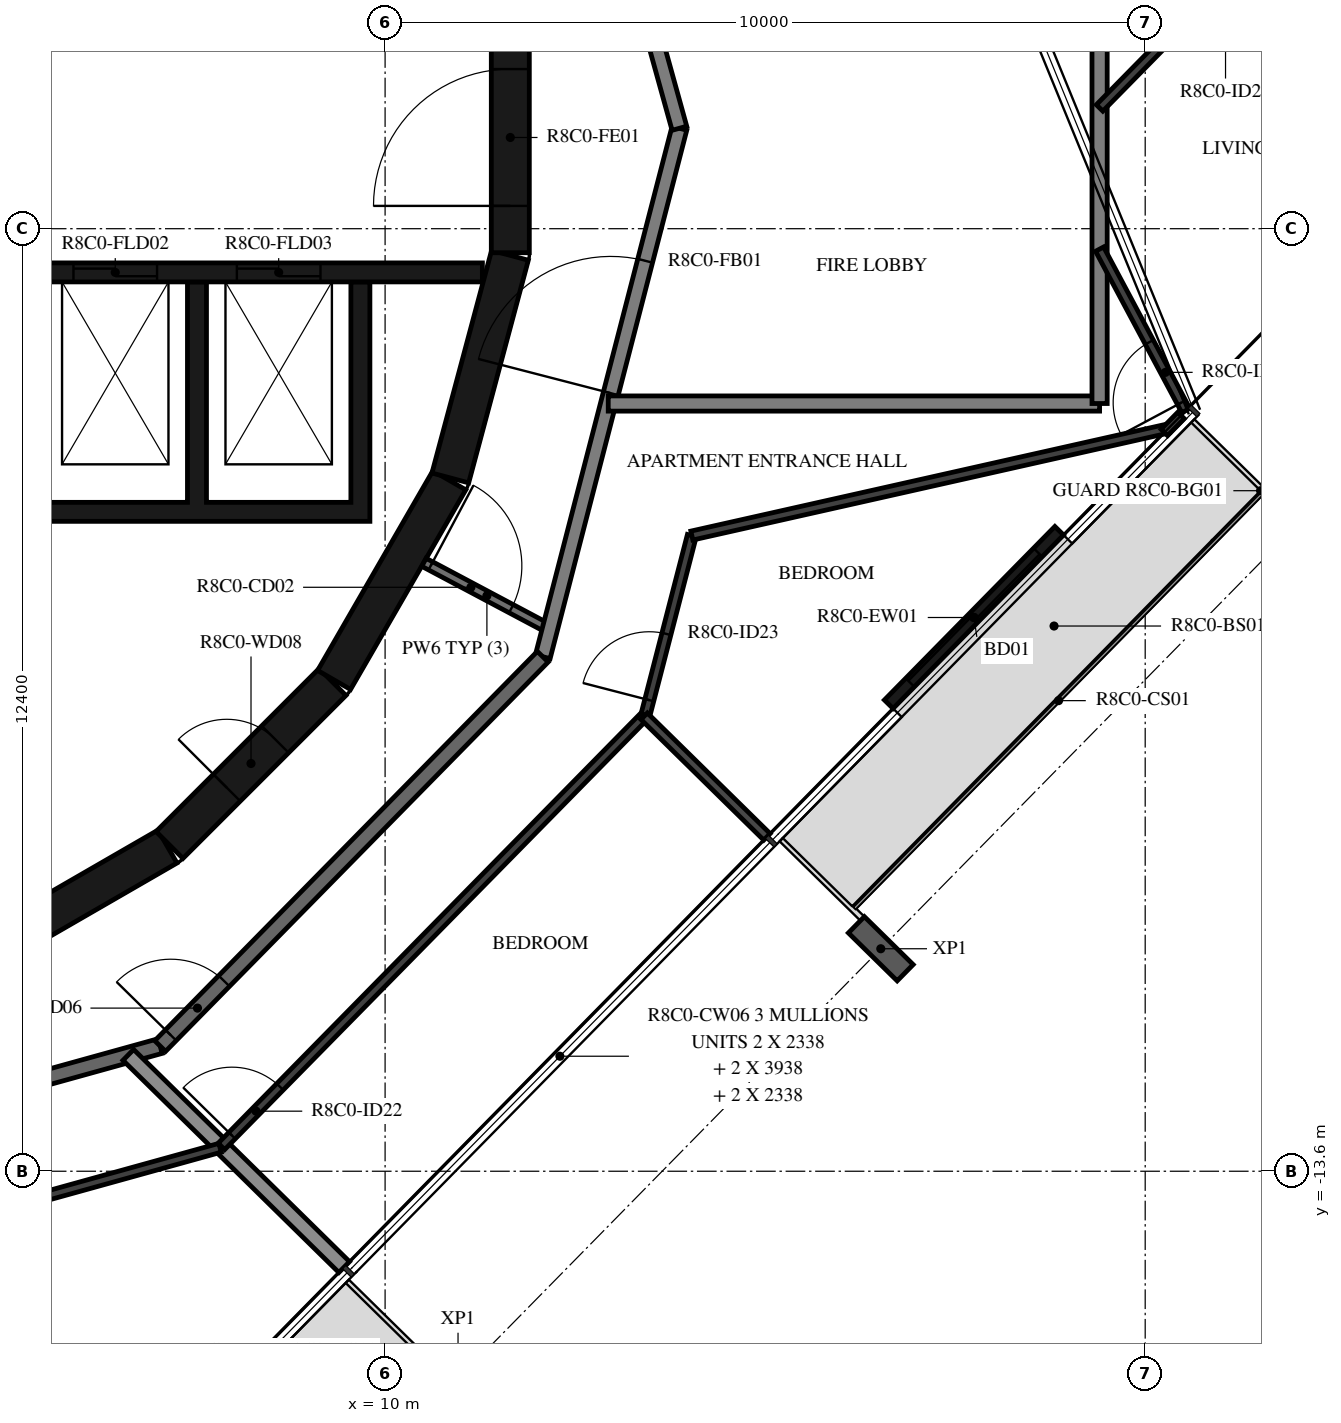
"""IFC4 building model, lengths in metres.
Left out: names, types, materials, properties, quantities, classifications, styles, units other than length and angle.
Written with IfcOpenShell. Run it as: python <this file> out.ifc"""

import sys

from ifc_helpers import new_model, si_unit, direction, frame, frame_2d, origin, origin_2d, place, context, subcontext, project, spatial, polyline, rectangle, i_section, outline, extrude, element, fill, save


model = new_model("IFC4")
c1 = context("Model", 3, precision=1e-05, world=origin(), true_north=direction((0.0, 1.0)))
c2 = subcontext(c1, "Body", "Model", "MODEL_VIEW")
j1 = project(units=[si_unit("LENGTHUNIT", "METRE"), si_unit("PLANEANGLEUNIT", "RADIAN")], contexts=[c1])
p1 = place(None, origin())
s1 = spatial("IfcSite", under=j1, at=p1, CompositionType="ELEMENT")
p2 = place(p1, origin())
s2 = spatial("IfcBuilding", under=s1, at=p2, CompositionType="ELEMENT")
p3 = place(p2, frame((0.0, 0.0, 319.2)))
s3 = spatial("IfcBuildingStorey", under=s2, at=p3, CompositionType="ELEMENT", Elevation=319.2)
p4 = place(p3, frame((16.521, -10.673, -0.38), z_axis=(0.0, 0.0, 1.0), x_axis=(-0.70090935439, -0.713250360623, 0.0)))
e1 = element("IfcColumn", 1, at=p4, inside=s3, PredefinedType="COLUMN", context=c2, shape_type="SweptSolid", body=[
    extrude(i_section(OverallWidth=0.3, OverallDepth=0.9, WebThickness=0.019, FlangeThickness=0.035, FilletRadius=0.03, at=origin_2d()), origin(), (0.0, 0.0, 1.0), 3.5),
])
p5 = place(p3, frame((16.626, -7.456, 0.0), z_axis=(0.0, 0.0, 1.0), x_axis=(0.700900076932, 0.713259477439, 0.0)))
e2 = element("IfcWall", 2, at=p5, inside=s3, PredefinedType="STANDARD", context=c2, shape_type="SweptSolid", body=[
    extrude(rectangle(XDim=3.2, YDim=0.16, at=frame_2d((1.6, 0.0))), origin(), (0.0, 0.0, 1.0), 3.12),
])
p6 = place(p5, frame((0.4, 0.0, 0.0)))
e3 = element("IfcOpeningElement", 3, at=p6, cuts=e2, PredefinedType="OPENING", context=c2, shape_type="SweptSolid", body=[
    extrude(rectangle(XDim=2.4, YDim=2.4, at=frame_2d((1.2, 1.2))), frame((0.0, 0.09, 0.0), z_axis=(0.0, -1.0, 0.0), x_axis=(1.0, 0.0, 0.0)), (0.0, 0.0, 1.0), 0.18),
])
p7 = place(p3, frame((4.51, -10.845, 0.0), z_axis=(0.0, 0.0, 1.0), x_axis=(0.865975092491, 0.500087131594, 0.0)))
e4 = element("IfcWall", 4, at=p7, inside=s3, PredefinedType="SHEAR", context=c2, shape_type="SweptSolid", body=[
    extrude(rectangle(XDim=3.033, YDim=0.5, at=frame_2d((1.516, 0.0))), origin(), (0.0, 0.0, 1.0), 3.12),
])
p8 = place(p3, frame((7.164, -9.308, 0.0), z_axis=(0.0, 0.0, 1.0), x_axis=(0.707106781187, 0.707106781187, 0.0)))
e5 = element("IfcWall", 5, at=p8, inside=s3, PredefinedType="SHEAR", context=c2, shape_type="SweptSolid", body=[
    extrude(rectangle(XDim=3.032, YDim=0.5, at=frame_2d((1.516, 0.0))), origin(), (0.0, 0.0, 1.0), 3.12),
])
p9 = place(p8, frame((1.066, 0.0, 0.0)))
e6 = element("IfcOpeningElement", 6, at=p9, cuts=e5, PredefinedType="OPENING", context=c2, shape_type="SweptSolid", body=[
    extrude(rectangle(XDim=0.9, YDim=2.1, at=frame_2d((0.45, 1.05))), frame((0.0, 0.26, 0.0), z_axis=(0.0, -1.0, 0.0), x_axis=(1.0, 0.0, 0.0)), (0.0, 0.0, 1.0), 0.52),
])
for number, where, z_axis, x_axis in (
    (7, (9.329, -7.137, 0.0), (0.0, 0.0, 1.0), (0.5, 0.866, 0.0)),
    (8, (10.858, -4.479, 0.0), (0.0, 0.0, 1.0), (0.259, 0.966, 0.0)),
):
    element("IfcWall", number, at=place(p3, frame(where, z_axis=z_axis, x_axis=x_axis)), inside=s3, PredefinedType="SHEAR", context=c2, shape_type="SweptSolid", body=[
        extrude(rectangle(XDim=3.033, YDim=0.5, at=frame_2d((1.516, 0.0))), origin(), (0.0, 0.0, 1.0), 3.12),
    ])
p10 = place(p3, frame((11.647, -1.516, 0.0), z_axis=(0.0, 0.0, 1.0), x_axis=(0.0, 1.0, 0.0)))
e9 = element("IfcWall", 9, at=p10, inside=s3, PredefinedType="SHEAR", context=c2, shape_type="SweptSolid", body=[
    extrude(rectangle(XDim=3.033, YDim=0.5, at=frame_2d((1.516, 0.0))), origin(), (0.0, 0.0, 1.0), 3.12),
])
p11 = place(p10, frame((0.616, 0.0, 0.0)))
e10 = element("IfcOpeningElement", 10, at=p11, cuts=e9, PredefinedType="OPENING", context=c2, shape_type="SweptSolid", body=[
    extrude(rectangle(XDim=1.8, YDim=2.1, at=frame_2d((0.9, 1.05))), frame((0.0, 0.26, 0.0), z_axis=(0.0, -1.0, 0.0), x_axis=(1.0, 0.0, 0.0)), (0.0, 0.0, 1.0), 0.52),
])
p12 = place(p3, origin())
e11 = element("IfcWall", 11, at=p12, inside=s3, PredefinedType="SHEAR", context=c2, shape_type="SweptSolid", body=[
    extrude(outline(polyline([(9.8, -5.05), (9.8, -4.8), (9.8, -1.9), (9.55, -1.9), (9.55, -4.8), (7.65, -4.8), (7.65, -1.9), (7.4, -1.9), (7.4, -4.8), (5.5, -4.8), (5.5, -1.9), (5.25, -1.9), (5.25, -4.8), (3.35, -4.8), (3.35, -1.9), (3.1, -1.9), (3.1, -4.8), (1.2, -4.8), (1.2, -1.9), (0.95, -1.9), (0.95, -4.8), (-0.95, -4.8), (-0.95, -1.9), (-1.2, -1.9), (-1.2, -4.8), (-3.1, -4.8), (-3.1, -1.9), (-3.35, -1.9), (-3.35, -4.8), (-5.25, -4.8), (-5.25, -1.9), (-5.5, -1.9), (-5.5, -4.8), (-9.55, -4.8), (-9.55, -1.9), (-9.8, -1.9), (-9.8, -4.8), (-9.8, -5.05), (9.8, -5.05)])), origin(), (0.0, 0.0, 1.0), 3.12),
])
p13 = place(p3, frame((3.35, -1.775, 0.0), z_axis=(0.0, 0.0, 1.0), x_axis=(1.0, 0.0, 0.0)))
e12 = element("IfcWall", 12, at=p13, inside=s3, PredefinedType="SHEAR", context=c2, shape_type="SweptSolid", body=[
    extrude(rectangle(XDim=7.93, YDim=0.25, at=frame_2d((3.965, 0.0))), origin(), (0.0, 0.0, 1.0), 3.12),
])
p14 = place(p13, frame((0.4, 0.0, 0.0)))
e13 = element("IfcOpeningElement", 13, at=p14, cuts=e12, PredefinedType="OPENING", context=c2, shape_type="SweptSolid", body=[
    extrude(rectangle(XDim=1.1, YDim=2.4, at=frame_2d((0.55, 1.2))), frame((0.0, 0.135, 0.0), z_axis=(0.0, -1.0, 0.0), x_axis=(1.0, 0.0, 0.0)), (0.0, 0.0, 1.0), 0.27),
])
p15 = place(p13, frame((2.55, 0.0, 0.0)))
e14 = element("IfcOpeningElement", 14, at=p15, cuts=e12, PredefinedType="OPENING", context=c2, shape_type="SweptSolid", body=[
    extrude(rectangle(XDim=1.1, YDim=2.4, at=frame_2d((0.55, 1.2))), frame((0.0, 0.135, 0.0), z_axis=(0.0, -1.0, 0.0), x_axis=(1.0, 0.0, 0.0)), (0.0, 0.0, 1.0), 0.27),
])
p16 = place(p13, frame((4.7, 0.0, 0.0)))
e15 = element("IfcOpeningElement", 15, at=p16, cuts=e12, PredefinedType="OPENING", context=c2, shape_type="SweptSolid", body=[
    extrude(rectangle(XDim=1.1, YDim=2.4, at=frame_2d((0.55, 1.2))), frame((0.0, 0.135, 0.0), z_axis=(0.0, -1.0, 0.0), x_axis=(1.0, 0.0, 0.0)), (0.0, 0.0, 1.0), 0.27),
])
p17 = place(p3, frame((10.511, -5.589, 0.0), z_axis=(0.0, 0.0, 1.0), x_axis=(0.882957311919, -0.469453283437, 0.0)))
e16 = element("IfcWall", 16, at=p17, inside=s3, PredefinedType="PARTITIONING", context=c2, shape_type="SweptSolid", body=[
    extrude(rectangle(XDim=1.876, YDim=0.12, at=frame_2d((0.938, 0.0))), origin(), (0.0, 0.0, 1.0), 3.12),
])
p18 = place(p17, frame((0.1, 0.0, 0.0)))
e17 = element("IfcOpeningElement", 17, at=p18, cuts=e16, PredefinedType="OPENING", context=c2, shape_type="SweptSolid", body=[
    extrude(rectangle(XDim=1.2, YDim=2.1, at=frame_2d((0.6, 1.05))), frame((0.0, 0.07, 0.0), z_axis=(0.0, -1.0, 0.0), x_axis=(1.0, 0.0, 0.0)), (0.0, 0.0, 1.0), 0.14),
])
p19 = place(p3, frame((12.074, -6.831, 0.0), z_axis=(0.0, 0.0, 1.0), x_axis=(0.250391063186, 0.968144780225, 0.0)))
e18 = element("IfcWall", 18, at=p19, inside=s3, PredefinedType="STANDARD", context=c2, shape_type="SweptSolid", body=[
    extrude(rectangle(XDim=7.181, YDim=0.2, at=frame_2d((3.591, 0.0))), origin(), (0.0, 0.0, 1.0), 3.12),
])
p20 = place(p19, frame((3.581, 0.0, 0.0)))
e19 = element("IfcOpeningElement", 19, at=p20, cuts=e18, PredefinedType="OPENING", context=c2, shape_type="SweptSolid", body=[
    extrude(rectangle(XDim=1.8, YDim=2.1, at=frame_2d((0.9, 1.05))), frame((0.0, 0.11, 0.0), z_axis=(0.0, -1.0, 0.0), x_axis=(1.0, 0.0, 0.0)), (0.0, 0.0, 1.0), 0.22),
])
p21 = place(p3, frame((13.872, 0.121, 0.0), z_axis=(0.0, 0.0, 1.0), x_axis=(-0.267291928416, 0.963615600228, 0.0)))
e20 = element("IfcWall", 20, at=p21, inside=s3, PredefinedType="STANDARD", context=c2, shape_type="SweptSolid", body=[
    extrude(rectangle(XDim=3.507, YDim=0.2, at=frame_2d((1.753, 0.0))), origin(), (0.0, 0.0, 1.0), 3.12),
])
p22 = place(p3, frame((0.121, -13.872, 0.0), z_axis=(0.0, 0.0, 1.0), x_axis=(0.963625960674, 0.267254575108, 0.0)))
e21 = element("IfcWall", 21, at=p22, inside=s3, PredefinedType="STANDARD", context=c2, shape_type="SweptSolid", body=[
    extrude(rectangle(XDim=7.181, YDim=0.2, at=frame_2d((3.591, 0.0))), origin(), (0.0, 0.0, 1.0), 3.12),
])
p23 = place(p3, frame((7.041, -11.953, 0.0), z_axis=(0.0, 0.0, 1.0), x_axis=(0.70090916255, 0.713250549143, 0.0)))
e22 = element("IfcWall", 22, at=p23, inside=s3, PredefinedType="STANDARD", context=c2, shape_type="SweptSolid", body=[
    extrude(rectangle(XDim=7.181, YDim=0.2, at=frame_2d((3.59, 0.0))), origin(), (0.0, 0.0, 1.0), 3.12),
])
p24 = place(p23, frame((0.2, 0.0, 0.0)))
e23 = element("IfcOpeningElement", 23, at=p24, cuts=e22, PredefinedType="OPENING", context=c2, shape_type="SweptSolid", body=[
    extrude(rectangle(XDim=1.0, YDim=2.1, at=frame_2d((0.5, 1.05))), frame((0.0, 0.11, 0.0), z_axis=(0.0, -1.0, 0.0), x_axis=(1.0, 0.0, 0.0)), (0.0, 0.0, 1.0), 0.22),
])
p25 = place(p3, frame((12.936, -3.5, 0.0), z_axis=(0.0, 0.0, 1.0), x_axis=(1.0, 0.0, 0.0)))
e24 = element("IfcWall", 24, at=p25, inside=s3, PredefinedType="STANDARD", context=c2, shape_type="SweptSolid", body=[
    extrude(rectangle(XDim=6.464, YDim=0.2, at=frame_2d((3.232, 0.0))), origin(), (0.0, 0.0, 1.0), 3.12),
])
p26 = place(p3, frame((19.4, -3.5, 0.0), z_axis=(0.0, 0.0, 1.0), x_axis=(0.0, 1.0, 0.0)))
e25 = element("IfcWall", 25, at=p26, inside=s3, PredefinedType="STANDARD", context=c2, shape_type="SweptSolid", body=[
    extrude(rectangle(XDim=6.954, YDim=0.2, at=frame_2d((3.477, 0.0))), origin(), (0.0, 0.0, 1.0), 3.12),
])
p27 = place(p3, frame((9.462, -14.861, 0.0), z_axis=(0.0, 0.0, 1.0), x_axis=(-0.713302018318, 0.700856783276, 0.0)))
e26 = element("IfcWall", 26, at=p27, inside=s3, PredefinedType="STANDARD", context=c2, shape_type="SweptSolid", body=[
    extrude(rectangle(XDim=3.982, YDim=0.2, at=frame_2d((1.991, 0.0))), origin(), (0.0, 0.0, 1.0), 2.73),
])
p28 = place(p3, frame((0.135, -15.425, 0.0), z_axis=(0.0, 0.0, 1.0), x_axis=(0.963633899075, 0.267225950373, 0.0)))
e27 = element("IfcWall", 27, at=p28, inside=s3, PredefinedType="PARTITIONING", context=c2, shape_type="SweptSolid", body=[
    extrude(rectangle(XDim=7.985, YDim=0.12, at=frame_2d((3.992, 0.0))), origin(), (0.0, 0.0, 1.0), 3.12),
])
p29 = place(p28, frame((0.2, 0.0, 0.0)))
e28 = element("IfcOpeningElement", 28, at=p29, cuts=e27, PredefinedType="OPENING", context=c2, shape_type="SweptSolid", body=[
    extrude(rectangle(XDim=0.8, YDim=2.1, at=frame_2d((0.4, 1.05))), frame((0.0, 0.07, 0.0), z_axis=(0.0, -1.0, 0.0), x_axis=(1.0, 0.0, 0.0)), (0.0, 0.0, 1.0), 0.14),
])
p30 = place(p28, frame((3.914, 0.0, 0.0)))
e29 = element("IfcOpeningElement", 29, at=p30, cuts=e27, PredefinedType="OPENING", context=c2, shape_type="SweptSolid", body=[
    extrude(rectangle(XDim=0.9, YDim=2.1, at=frame_2d((0.45, 1.05))), frame((0.0, 0.07, 0.0), z_axis=(0.0, -1.0, 0.0), x_axis=(1.0, 0.0, 0.0)), (0.0, 0.0, 1.0), 0.14),
])
p31 = place(p3, frame((20.535, -3.593, 0.0), z_axis=(0.0, 0.0, 1.0), x_axis=(-0.471340561072, 0.881951288614, 0.0)))
e30 = element("IfcWall", 30, at=p31, inside=s3, PredefinedType="PARTITIONING", context=c2, shape_type="SweptSolid", body=[
    extrude(rectangle(XDim=2.408, YDim=0.12, at=frame_2d((1.204, 0.0))), origin(), (0.0, 0.0, 1.0), 3.12),
])
p32 = place(p31, frame((0.12, 0.0, 0.0)))
e31 = element("IfcOpeningElement", 31, at=p32, cuts=e30, PredefinedType="OPENING", context=c2, shape_type="SweptSolid", body=[
    extrude(rectangle(XDim=0.9, YDim=2.1, at=frame_2d((0.45, 1.05))), frame((0.0, 0.07, 0.0), z_axis=(0.0, -1.0, 0.0), x_axis=(1.0, 0.0, 0.0)), (0.0, 0.0, 1.0), 0.14),
])
p33 = place(p3, frame((7.846, -13.273, 0.0), z_axis=(0.0, 0.0, 1.0), x_axis=(0.700911018066, 0.713248725728, 0.0)))
e32 = element("IfcWall", 32, at=p33, inside=s3, PredefinedType="PARTITIONING", context=c2, shape_type="SweptSolid", body=[
    extrude(rectangle(XDim=7.935, YDim=0.12, at=frame_2d((3.968, 0.0))), origin(), (0.0, 0.0, 1.0), 3.12),
])
p34 = place(p33, frame((0.2, 0.0, 0.0)))
e33 = element("IfcOpeningElement", 33, at=p34, cuts=e32, PredefinedType="OPENING", context=c2, shape_type="SweptSolid", body=[
    extrude(rectangle(XDim=0.9, YDim=2.1, at=frame_2d((0.45, 1.05))), frame((0.0, 0.07, 0.0), z_axis=(0.0, -1.0, 0.0), x_axis=(1.0, 0.0, 0.0)), (0.0, 0.0, 1.0), 0.14),
])
p35 = place(p3, frame((13.426, -7.596, 0.0), z_axis=(0.0, 0.0, 1.0), x_axis=(0.250402253482, 0.968141886012, 0.0)))
e34 = element("IfcWall", 34, at=p35, inside=s3, PredefinedType="PARTITIONING", context=c2, shape_type="SweptSolid", body=[
    extrude(rectangle(XDim=2.437, YDim=0.12, at=frame_2d((1.218, 0.0))), origin(), (0.0, 0.0, 1.0), 3.12),
])
p36 = place(p35, frame((0.2, 0.0, 0.0)))
e35 = element("IfcOpeningElement", 35, at=p36, cuts=e34, PredefinedType="OPENING", context=c2, shape_type="SweptSolid", body=[
    extrude(rectangle(XDim=0.9, YDim=2.1, at=frame_2d((0.45, 1.05))), frame((0.0, 0.07, 0.0), z_axis=(0.0, -1.0, 0.0), x_axis=(1.0, 0.0, 0.0)), (0.0, 0.0, 1.0), 0.14),
])
p37 = place(p3, frame((14.036, -5.237, 0.0), z_axis=(0.0, 0.0, 1.0), x_axis=(0.975645756324, 0.219352132805, 0.0)))
e36 = element("IfcWall", 36, at=p37, inside=s3, PredefinedType="PARTITIONING", context=c2, shape_type="SweptSolid", body=[
    extrude(rectangle(XDim=6.424, YDim=0.12, at=frame_2d((3.212, 0.0))), origin(), (0.0, 0.0, 1.0), 3.12),
])
p38 = place(p3, frame((20.471, -3.657, 0.0), z_axis=(0.0, 0.0, 1.0), x_axis=(-0.700842635321, -0.713315919153, 0.0)))
e37 = element("IfcWall", 37, at=p38, inside=s3, PredefinedType="PARTITIONING", context=c2, shape_type="SweptSolid", body=[
    extrude(rectangle(XDim=0.313, YDim=0.12, at=frame_2d((0.157, 0.0))), origin(), (0.0, 0.0, 1.0), 3.12),
])
p39 = place(p3, frame((20.654, 1.665, 0.0), z_axis=(0.0, 0.0, 1.0), x_axis=(-0.700870484553, -0.713288555833, 0.0)))
e38 = element("IfcWall", 38, at=p39, inside=s3, PredefinedType="PARTITIONING", context=c2, shape_type="SweptSolid", body=[
    extrude(rectangle(XDim=1.789, YDim=0.12, at=frame_2d((0.895, 0.0))), origin(), (0.0, 0.0, 1.0), 3.12),
])
p40 = place(p3, frame((15.024, -9.201, 0.0), z_axis=(0.0, 0.0, 1.0), x_axis=(-0.713331704042, 0.700826569137, 0.0)))
e39 = element("IfcWall", 39, at=p40, inside=s3, PredefinedType="PARTITIONING", context=c2, shape_type="SweptSolid", body=[
    extrude(rectangle(XDim=2.265, YDim=0.12, at=frame_2d((1.132, 0.0))), origin(), (0.0, 0.0, 1.0), 2.73),
])
p41 = place(p6, origin())
e40 = element("IfcDoor", 40, at=p41, inside=s3, OperationType="DOUBLE_DOOR_SLIDING", PredefinedType="DOOR", context=c2, shape_type="SweptSolid", body=[
    extrude(rectangle(XDim=2.4, YDim=2.4, at=frame_2d((1.2, 1.2))), frame((0.0, 0.025, 0.0), z_axis=(0.0, -1.0, 0.0), x_axis=(1.0, 0.0, 0.0)), (0.0, 0.0, 1.0), 0.05),
])
fill(e3, e40)
p42 = place(p11, origin())
e41 = element("IfcDoor", 41, at=p42, inside=s3, OperationType="DOUBLE_DOOR_SINGLE_SWING", PredefinedType="DOOR", context=c2, shape_type="SweptSolid", body=[
    extrude(rectangle(XDim=1.8, YDim=2.1, at=frame_2d((0.9, 1.05))), frame((0.0, 0.025, 0.0), z_axis=(0.0, -1.0, 0.0), x_axis=(1.0, 0.0, 0.0)), (0.0, 0.0, 1.0), 0.05),
])
fill(e10, e41)
p43 = place(p15, origin())
e42 = element("IfcDoor", 42, at=p43, inside=s3, OperationType="DOUBLE_DOOR_SLIDING", PredefinedType="DOOR", context=c2, shape_type="SweptSolid", body=[
    extrude(rectangle(XDim=1.1, YDim=2.4, at=frame_2d((0.55, 1.2))), frame((0.0, 0.025, 0.0), z_axis=(0.0, -1.0, 0.0), x_axis=(1.0, 0.0, 0.0)), (0.0, 0.0, 1.0), 0.05),
])
fill(e14, e42)
p44 = place(p16, origin())
e43 = element("IfcDoor", 43, at=p44, inside=s3, OperationType="DOUBLE_DOOR_SLIDING", PredefinedType="DOOR", context=c2, shape_type="SweptSolid", body=[
    extrude(rectangle(XDim=1.1, YDim=2.4, at=frame_2d((0.55, 1.2))), frame((0.0, 0.025, 0.0), z_axis=(0.0, -1.0, 0.0), x_axis=(1.0, 0.0, 0.0)), (0.0, 0.0, 1.0), 0.05),
])
fill(e15, e43)
p45 = place(p9, origin())
e44 = element("IfcDoor", 44, at=p45, inside=s3, OperationType="SINGLE_SWING_RIGHT", PredefinedType="DOOR", context=c2, shape_type="SweptSolid", body=[
    extrude(rectangle(XDim=0.9, YDim=2.1, at=frame_2d((0.45, 1.05))), frame((0.0, 0.025, 0.0), z_axis=(0.0, -1.0, 0.0), x_axis=(1.0, 0.0, 0.0)), (0.0, 0.0, 1.0), 0.05),
])
fill(e6, e44)
p46 = place(p24, origin())
e45 = element("IfcDoor", 45, at=p46, inside=s3, OperationType="SINGLE_SWING_LEFT", PredefinedType="DOOR", context=c2, shape_type="SweptSolid", body=[
    extrude(rectangle(XDim=1.0, YDim=2.1, at=frame_2d((0.5, 1.05))), frame((0.0, 0.025, 0.0), z_axis=(0.0, -1.0, 0.0), x_axis=(1.0, 0.0, 0.0)), (0.0, 0.0, 1.0), 0.05),
])
fill(e23, e45)
p47 = place(p32, origin())
e46 = element("IfcDoor", 46, at=p47, inside=s3, OperationType="SINGLE_SWING_RIGHT", PredefinedType="DOOR", context=c2, shape_type="SweptSolid", body=[
    extrude(rectangle(XDim=0.9, YDim=2.1, at=frame_2d((0.45, 1.05))), frame((0.0, 0.025, 0.0), z_axis=(0.0, -1.0, 0.0), x_axis=(1.0, 0.0, 0.0)), (0.0, 0.0, 1.0), 0.05),
])
fill(e31, e46)
p48 = place(p34, origin())
e47 = element("IfcDoor", 47, at=p48, inside=s3, OperationType="SINGLE_SWING_LEFT", PredefinedType="DOOR", context=c2, shape_type="SweptSolid", body=[
    extrude(rectangle(XDim=0.9, YDim=2.1, at=frame_2d((0.45, 1.05))), frame((0.0, 0.025, 0.0), z_axis=(0.0, -1.0, 0.0), x_axis=(1.0, 0.0, 0.0)), (0.0, 0.0, 1.0), 0.05),
])
fill(e33, e47)
p49 = place(p36, origin())
e48 = element("IfcDoor", 48, at=p49, inside=s3, OperationType="SINGLE_SWING_RIGHT", PredefinedType="DOOR", context=c2, shape_type="SweptSolid", body=[
    extrude(rectangle(XDim=0.9, YDim=2.1, at=frame_2d((0.45, 1.05))), frame((0.0, 0.025, 0.0), z_axis=(0.0, -1.0, 0.0), x_axis=(1.0, 0.0, 0.0)), (0.0, 0.0, 1.0), 0.05),
])
fill(e35, e48)
p50 = place(p18, origin())
e49 = element("IfcDoor", 49, at=p50, inside=s3, OperationType="DOUBLE_DOOR_SINGLE_SWING", PredefinedType="DOOR", context=c2, shape_type="SweptSolid", body=[
    extrude(rectangle(XDim=1.2, YDim=2.1, at=frame_2d((0.6, 1.05))), frame((0.0, 0.025, 0.0), z_axis=(0.0, -1.0, 0.0), x_axis=(1.0, 0.0, 0.0)), (0.0, 0.0, 1.0), 0.05),
])
fill(e17, e49)
p51 = place(p20, origin())
e50 = element("IfcDoor", 50, at=p51, inside=s3, OperationType="DOUBLE_DOOR_SINGLE_SWING", PredefinedType="DOOR", context=c2, shape_type="SweptSolid", body=[
    extrude(rectangle(XDim=1.8, YDim=2.1, at=frame_2d((0.9, 1.05))), frame((0.0, 0.025, 0.0), z_axis=(0.0, -1.0, 0.0), x_axis=(1.0, 0.0, 0.0)), (0.0, 0.0, 1.0), 0.05),
])
fill(e19, e50)
save(model, sys.argv[1])
